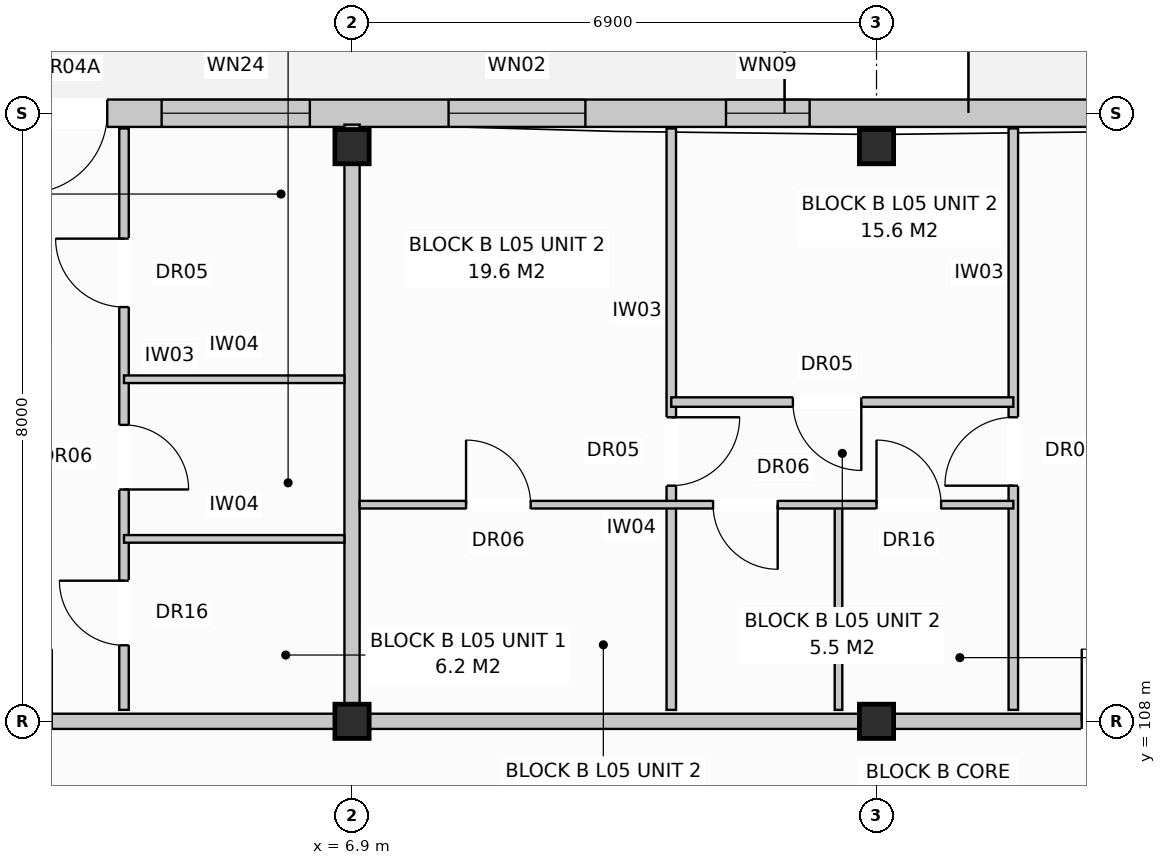
"""IFC4 building model, lengths in metres.
Left out: names, types, materials, properties, quantities, classifications, styles, units other than length and angle.
Written with IfcOpenShell. Run it as: python <this file> out.ifc"""

import sys

from ifc_helpers import new_model, si_unit, direction, frame, frame_2d, origin, origin_with_axes, origin_2d, place, context, subcontext, project, spatial, rectangle, extrude, element, fill, save


model = new_model("IFC4")
c1 = context("Model", 3, precision=1e-05, world=origin(), true_north=direction((0.0, 1.0)))
c2 = subcontext(c1, "Body", "Model", "MODEL_VIEW")
j1 = project(units=[si_unit("LENGTHUNIT", "METRE"), si_unit("PLANEANGLEUNIT", "RADIAN")], contexts=[c1])
p1 = place(None, origin())
s1 = spatial("IfcSite", under=j1, at=p1, CompositionType="ELEMENT")
p2 = place(p1, origin())
s2 = spatial("IfcBuilding", under=s1, at=p2, CompositionType="ELEMENT")
p3 = place(p2, frame((0.0, 0.0, 17.6)))
s3 = spatial("IfcBuildingStorey", under=s2, at=p3, CompositionType="ELEMENT", Elevation=17.6)
for number, where, z_axis, x_axis in (
    (1, (6.9, 108.0, 0.0), (0.0, 0.0, 1.0), (1.0, 0.0, 0.0)),
    (2, (6.9, 115.56, 0.0), (0.0, 0.0, 1.0), (1.0, 0.0, 0.0)),
    (3, (13.8, 108.0, 0.0), (0.0, 0.0, 1.0), (1.0, 0.0, 0.0)),
    (4, (13.8, 115.56, 0.0), (0.0, 0.0, 1.0), (1.0, 0.0, 0.0)),
):
    element("IfcColumn", number, at=place(p3, frame(where, z_axis=z_axis, x_axis=x_axis)), inside=s3, PredefinedType="COLUMN", context=c2, shape_type="SweptSolid", body=[
        extrude(rectangle(XDim=0.45, YDim=0.45, at=origin_2d()), origin(), (0.0, 0.0, 1.0), 3.2),
    ])
p4 = place(p3, frame((0.17, 116.0, 0.0), z_axis=(0.0, 0.0, 1.0), x_axis=(1.0, 0.0, 0.0)))
e5 = element("IfcWall", 5, at=p4, inside=s3, PredefinedType="STANDARD", context=c2, shape_type="SweptSolid", body=[
    extrude(rectangle(XDim=54.86, YDim=0.36, at=frame_2d((27.43, 0.0))), origin(), (0.0, 0.0, 1.0), 2.95),
])
p5 = place(p4, frame((2.459, 0.0, 0.0)))
e6 = element("IfcOpeningElement", 6, at=p5, cuts=e5, PredefinedType="OPENING", context=c2, shape_type="SweptSolid", body=[
    extrude(rectangle(XDim=1.05, YDim=2.12, at=frame_2d((0.525, 1.06))), frame((0.0, 0.192, 0.0), z_axis=(0.0, -1.0, 0.0), x_axis=(1.0, 0.0, 0.0)), (0.0, 0.0, 1.0), 0.384),
])
p6 = place(p4, frame((18.85, 0.0, 0.0)))
e7 = element("IfcOpeningElement", 7, at=p6, cuts=e5, PredefinedType="OPENING", context=c2, shape_type="SweptSolid", body=[
    extrude(rectangle(XDim=1.05, YDim=2.12, at=frame_2d((0.525, 1.06))), frame((0.0, 0.192, 0.0), z_axis=(0.0, -1.0, 0.0), x_axis=(1.0, 0.0, 0.0)), (0.0, 0.0, 1.0), 0.384),
])
p7 = place(p4, frame((28.76, 0.0, 0.0)))
e8 = element("IfcOpeningElement", 8, at=p7, cuts=e5, PredefinedType="OPENING", context=c2, shape_type="SweptSolid", body=[
    extrude(rectangle(XDim=1.05, YDim=2.12, at=frame_2d((0.525, 1.06))), frame((0.0, 0.192, 0.0), z_axis=(0.0, -1.0, 0.0), x_axis=(1.0, 0.0, 0.0)), (0.0, 0.0, 1.0), 0.384),
])
p8 = place(p4, frame((46.45, 0.0, 0.0)))
e9 = element("IfcOpeningElement", 9, at=p8, cuts=e5, PredefinedType="OPENING", context=c2, shape_type="SweptSolid", body=[
    extrude(rectangle(XDim=1.05, YDim=2.12, at=frame_2d((0.525, 1.06))), frame((0.0, 0.192, 0.0), z_axis=(0.0, -1.0, 0.0), x_axis=(1.0, 0.0, 0.0)), (0.0, 0.0, 1.0), 0.384),
])
p9 = place(p4, frame((0.75, 0.0, 0.72)))
e10 = element("IfcOpeningElement", 10, at=p9, cuts=e5, PredefinedType="OPENING", context=c2, shape_type="SweptSolid", body=[
    extrude(rectangle(XDim=1.1, YDim=1.5, at=frame_2d((0.55, 0.75))), frame((0.0, 0.192, 0.0), z_axis=(0.0, -1.0, 0.0), x_axis=(1.0, 0.0, 0.0)), (0.0, 0.0, 1.0), 0.384),
])
p10 = place(p4, frame((4.225, 0.0, 0.8)))
e11 = element("IfcOpeningElement", 11, at=p10, cuts=e5, PredefinedType="OPENING", context=c2, shape_type="SweptSolid", body=[
    extrude(rectangle(XDim=1.95, YDim=1.65, at=frame_2d((0.975, 0.825))), frame((0.0, 0.192, 0.0), z_axis=(0.0, -1.0, 0.0), x_axis=(1.0, 0.0, 0.0)), (0.0, 0.0, 1.0), 0.384),
])
p11 = place(p4, frame((8.0, 0.0, 0.8)))
e12 = element("IfcOpeningElement", 12, at=p11, cuts=e5, PredefinedType="OPENING", context=c2, shape_type="SweptSolid", body=[
    extrude(rectangle(XDim=1.8, YDim=1.7, at=frame_2d((0.9, 0.85))), frame((0.0, 0.192, 0.0), z_axis=(0.0, -1.0, 0.0), x_axis=(1.0, 0.0, 0.0)), (0.0, 0.0, 1.0), 0.384),
])
p12 = place(p4, frame((11.65, 0.0, 0.72)))
e13 = element("IfcOpeningElement", 13, at=p12, cuts=e5, PredefinedType="OPENING", context=c2, shape_type="SweptSolid", body=[
    extrude(rectangle(XDim=1.1, YDim=1.5, at=frame_2d((0.55, 0.75))), frame((0.0, 0.192, 0.0), z_axis=(0.0, -1.0, 0.0), x_axis=(1.0, 0.0, 0.0)), (0.0, 0.0, 1.0), 0.384),
])
p13 = place(p4, frame((16.675, 0.0, 0.8)))
e14 = element("IfcOpeningElement", 14, at=p13, cuts=e5, PredefinedType="OPENING", context=c2, shape_type="SweptSolid", body=[
    extrude(rectangle(XDim=1.95, YDim=1.65, at=frame_2d((0.975, 0.825))), frame((0.0, 0.192, 0.0), z_axis=(0.0, -1.0, 0.0), x_axis=(1.0, 0.0, 0.0)), (0.0, 0.0, 1.0), 0.384),
])
p14 = place(p4, frame((22.3, 0.0, 0.8)))
e15 = element("IfcOpeningElement", 15, at=p14, cuts=e5, PredefinedType="OPENING", context=c2, shape_type="SweptSolid", body=[
    extrude(rectangle(XDim=1.8, YDim=1.7, at=frame_2d((0.9, 0.85))), frame((0.0, 0.192, 0.0), z_axis=(0.0, -1.0, 0.0), x_axis=(1.0, 0.0, 0.0)), (0.0, 0.0, 1.0), 0.384),
])
p15 = place(p4, frame((31.15, 0.0, 0.72)))
e16 = element("IfcOpeningElement", 16, at=p15, cuts=e5, PredefinedType="OPENING", context=c2, shape_type="SweptSolid", body=[
    extrude(rectangle(XDim=1.9, YDim=1.85, at=frame_2d((0.95, 0.925))), frame((0.0, 0.192, 0.0), z_axis=(0.0, -1.0, 0.0), x_axis=(1.0, 0.0, 0.0)), (0.0, 0.0, 1.0), 0.384),
])
p16 = place(p4, frame((36.525, 0.0, 0.8)))
e17 = element("IfcOpeningElement", 17, at=p16, cuts=e5, PredefinedType="OPENING", context=c2, shape_type="SweptSolid", body=[
    extrude(rectangle(XDim=1.95, YDim=1.65, at=frame_2d((0.975, 0.825))), frame((0.0, 0.192, 0.0), z_axis=(0.0, -1.0, 0.0), x_axis=(1.0, 0.0, 0.0)), (0.0, 0.0, 1.0), 0.384),
])
p17 = place(p4, frame((42.3, 0.0, 0.8)))
e18 = element("IfcOpeningElement", 18, at=p17, cuts=e5, PredefinedType="OPENING", context=c2, shape_type="SweptSolid", body=[
    extrude(rectangle(XDim=1.8, YDim=1.7, at=frame_2d((0.9, 0.85))), frame((0.0, 0.192, 0.0), z_axis=(0.0, -1.0, 0.0), x_axis=(1.0, 0.0, 0.0)), (0.0, 0.0, 1.0), 0.384),
])
p18 = place(p4, frame((49.05, 0.0, 0.72)))
e19 = element("IfcOpeningElement", 19, at=p18, cuts=e5, PredefinedType="OPENING", context=c2, shape_type="SweptSolid", body=[
    extrude(rectangle(XDim=1.1, YDim=1.5, at=frame_2d((0.55, 0.75))), frame((0.0, 0.192, 0.0), z_axis=(0.0, -1.0, 0.0), x_axis=(1.0, 0.0, 0.0)), (0.0, 0.0, 1.0), 0.384),
])
p19 = place(p4, frame((52.025, 0.0, 0.8)))
e20 = element("IfcOpeningElement", 20, at=p19, cuts=e5, PredefinedType="OPENING", context=c2, shape_type="SweptSolid", body=[
    extrude(rectangle(XDim=1.95, YDim=1.65, at=frame_2d((0.975, 0.825))), frame((0.0, 0.192, 0.0), z_axis=(0.0, -1.0, 0.0), x_axis=(1.0, 0.0, 0.0)), (0.0, 0.0, 1.0), 0.384),
])
p20 = place(p3, frame((6.9, 108.15, 0.0), z_axis=(0.0, 0.0, 1.0), x_axis=(0.0, 1.0, 0.0)))
e21 = element("IfcWall", 21, at=p20, inside=s3, PredefinedType="PARTITIONING", context=c2, shape_type="SweptSolid", body=[
    extrude(rectangle(XDim=7.7, YDim=0.2, at=frame_2d((3.85, 0.0))), origin(), (0.0, 0.0, 1.0), 2.39),
])
p21 = place(p3, frame((0.0, 108.0, 0.0), z_axis=(0.0, 0.0, 1.0), x_axis=(1.0, 0.0, 0.0)))
e22 = element("IfcWall", 22, at=p21, inside=s3, PredefinedType="PARTITIONING", context=c2, shape_type="SweptSolid", body=[
    extrude(rectangle(XDim=6.9, YDim=0.2, at=frame_2d((3.45, 0.0))), origin(), (0.0, 0.0, 1.0), 2.39),
])
p22 = place(p21, frame((2.0, 0.0, 0.0)))
e23 = element("IfcOpeningElement", 23, at=p22, cuts=e22, PredefinedType="OPENING", context=c2, shape_type="SweptSolid", body=[
    extrude(rectangle(XDim=0.95, YDim=2.15, at=frame_2d((0.475, 1.075))), frame((0.0, 0.112, 0.0), z_axis=(0.0, -1.0, 0.0), x_axis=(1.0, 0.0, 0.0)), (0.0, 0.0, 1.0), 0.224),
])
p23 = place(p3, frame((3.9, 108.15, 0.0), z_axis=(0.0, 0.0, 1.0), x_axis=(0.0, 1.0, 0.0)))
e24 = element("IfcWall", 24, at=p23, inside=s3, PredefinedType="PARTITIONING", context=c2, shape_type="SweptSolid", body=[
    extrude(rectangle(XDim=7.65, YDim=0.125, at=frame_2d((3.825, 0.0))), origin(), (0.0, 0.0, 1.0), 2.95),
])
p24 = place(p23, frame((0.85, 0.0, 0.0)))
e25 = element("IfcOpeningElement", 25, at=p24, cuts=e24, PredefinedType="OPENING", context=c2, shape_type="SweptSolid", body=[
    extrude(rectangle(XDim=0.85, YDim=2.1, at=frame_2d((0.425, 1.05))), frame((0.0, 0.074, 0.0), z_axis=(0.0, -1.0, 0.0), x_axis=(1.0, 0.0, 0.0)), (0.0, 0.0, 1.0), 0.149),
])
p25 = place(p23, frame((2.9, 0.0, 0.0)))
e26 = element("IfcOpeningElement", 26, at=p25, cuts=e24, PredefinedType="OPENING", context=c2, shape_type="SweptSolid", body=[
    extrude(rectangle(XDim=0.85, YDim=2.05, at=frame_2d((0.425, 1.025))), frame((0.0, 0.074, 0.0), z_axis=(0.0, -1.0, 0.0), x_axis=(1.0, 0.0, 0.0)), (0.0, 0.0, 1.0), 0.149),
])
p26 = place(p23, frame((5.3, 0.0, 0.0)))
e27 = element("IfcOpeningElement", 27, at=p26, cuts=e24, PredefinedType="OPENING", context=c2, shape_type="SweptSolid", body=[
    extrude(rectangle(XDim=0.9, YDim=2.1, at=frame_2d((0.45, 1.05))), frame((0.0, 0.074, 0.0), z_axis=(0.0, -1.0, 0.0), x_axis=(1.0, 0.0, 0.0)), (0.0, 0.0, 1.0), 0.149),
])
for number, where, z_axis, x_axis in (
    (28, (3.9, 110.4, 0.0), (0.0, 0.0, 1.0), (1.0, 0.0, 0.0)),
    (29, (3.9, 112.5, 0.0), (0.0, 0.0, 1.0), (1.0, 0.0, 0.0)),
):
    element("IfcWall", number, at=place(p3, frame(where, z_axis=z_axis, x_axis=x_axis)), inside=s3, PredefinedType="PARTITIONING", context=c2, shape_type="SweptSolid", body=[
        extrude(rectangle(XDim=2.9, YDim=0.1, at=frame_2d((1.45, 0.0))), origin(), (0.0, 0.0, 1.0), 2.95),
    ])
p27 = place(p3, frame((6.9, 108.0, 0.0), z_axis=(0.0, 0.0, 1.0), x_axis=(1.0, 0.0, 0.0)))
e30 = element("IfcWall", 30, at=p27, inside=s3, PredefinedType="PARTITIONING", context=c2, shape_type="SweptSolid", body=[
    extrude(rectangle(XDim=13.8, YDim=0.2, at=frame_2d((6.9, 0.0))), origin(), (0.0, 0.0, 1.0), 2.39),
])
p28 = place(p27, frame((9.6, 0.0, 0.0)))
e31 = element("IfcOpeningElement", 31, at=p28, cuts=e30, PredefinedType="OPENING", context=c2, shape_type="SweptSolid", body=[
    extrude(rectangle(XDim=0.95, YDim=2.15, at=frame_2d((0.475, 1.075))), frame((0.0, 0.112, 0.0), z_axis=(0.0, -1.0, 0.0), x_axis=(1.0, 0.0, 0.0)), (0.0, 0.0, 1.0), 0.224),
])
p29 = place(p3, frame((15.6, 108.15, 0.0), z_axis=(0.0, 0.0, 1.0), x_axis=(0.0, 1.0, 0.0)))
e32 = element("IfcWall", 32, at=p29, inside=s3, PredefinedType="PARTITIONING", context=c2, shape_type="SweptSolid", body=[
    extrude(rectangle(XDim=7.65, YDim=0.125, at=frame_2d((3.825, 0.0))), origin(), (0.0, 0.0, 1.0), 2.95),
])
p30 = place(p29, frame((2.95, 0.0, 0.0)))
e33 = element("IfcOpeningElement", 33, at=p30, cuts=e32, PredefinedType="OPENING", context=c2, shape_type="SweptSolid", body=[
    extrude(rectangle(XDim=0.9, YDim=2.1, at=frame_2d((0.45, 1.05))), frame((0.0, 0.074, 0.0), z_axis=(0.0, -1.0, 0.0), x_axis=(1.0, 0.0, 0.0)), (0.0, 0.0, 1.0), 0.149),
])
p31 = place(p3, frame((11.1, 108.15, 0.0), z_axis=(0.0, 0.0, 1.0), x_axis=(0.0, 1.0, 0.0)))
e34 = element("IfcWall", 34, at=p31, inside=s3, PredefinedType="PARTITIONING", context=c2, shape_type="SweptSolid", body=[
    extrude(rectangle(XDim=7.65, YDim=0.125, at=frame_2d((3.825, 0.0))), origin(), (0.0, 0.0, 1.0), 2.95),
])
p32 = place(p31, frame((2.95, 0.0, 0.0)))
e35 = element("IfcOpeningElement", 35, at=p32, cuts=e34, PredefinedType="OPENING", context=c2, shape_type="SweptSolid", body=[
    extrude(rectangle(XDim=0.9, YDim=2.1, at=frame_2d((0.45, 1.05))), frame((0.0, 0.074, 0.0), z_axis=(0.0, -1.0, 0.0), x_axis=(1.0, 0.0, 0.0)), (0.0, 0.0, 1.0), 0.149),
])
p33 = place(p3, frame((13.3, 108.15, 0.0), z_axis=(0.0, 0.0, 1.0), x_axis=(0.0, 1.0, 0.0)))
e36 = element("IfcWall", 36, at=p33, inside=s3, PredefinedType="PARTITIONING", context=c2, shape_type="SweptSolid", body=[
    extrude(rectangle(XDim=2.7, YDim=0.1, at=frame_2d((1.35, 0.0))), origin(), (0.0, 0.0, 1.0), 2.95),
])
p34 = place(p3, frame((7.0, 110.85, 0.0), z_axis=(0.0, 0.0, 1.0), x_axis=(1.0, 0.0, 0.0)))
e37 = element("IfcWall", 37, at=p34, inside=s3, PredefinedType="PARTITIONING", context=c2, shape_type="SweptSolid", body=[
    extrude(rectangle(XDim=8.6, YDim=0.1, at=frame_2d((4.3, 0.0))), origin(), (0.0, 0.0, 1.0), 2.95),
])
p35 = place(p34, frame((1.4, 0.0, 0.0)))
e38 = element("IfcOpeningElement", 38, at=p35, cuts=e37, PredefinedType="OPENING", context=c2, shape_type="SweptSolid", body=[
    extrude(rectangle(XDim=0.85, YDim=2.05, at=frame_2d((0.425, 1.025))), frame((0.0, 0.062, 0.0), z_axis=(0.0, -1.0, 0.0), x_axis=(1.0, 0.0, 0.0)), (0.0, 0.0, 1.0), 0.124),
])
p36 = place(p34, frame((4.65, 0.0, 0.0)))
e39 = element("IfcOpeningElement", 39, at=p36, cuts=e37, PredefinedType="OPENING", context=c2, shape_type="SweptSolid", body=[
    extrude(rectangle(XDim=0.85, YDim=2.05, at=frame_2d((0.425, 1.025))), frame((0.0, 0.062, 0.0), z_axis=(0.0, -1.0, 0.0), x_axis=(1.0, 0.0, 0.0)), (0.0, 0.0, 1.0), 0.124),
])
p37 = place(p34, frame((6.8, 0.0, 0.0)))
e40 = element("IfcOpeningElement", 40, at=p37, cuts=e37, PredefinedType="OPENING", context=c2, shape_type="SweptSolid", body=[
    extrude(rectangle(XDim=0.85, YDim=2.1, at=frame_2d((0.425, 1.05))), frame((0.0, 0.062, 0.0), z_axis=(0.0, -1.0, 0.0), x_axis=(1.0, 0.0, 0.0)), (0.0, 0.0, 1.0), 0.124),
])
p38 = place(p3, frame((11.1, 112.2, 0.0), z_axis=(0.0, 0.0, 1.0), x_axis=(1.0, 0.0, 0.0)))
e41 = element("IfcWall", 41, at=p38, inside=s3, PredefinedType="PARTITIONING", context=c2, shape_type="SweptSolid", body=[
    extrude(rectangle(XDim=4.5, YDim=0.125, at=frame_2d((2.25, 0.0))), origin(), (0.0, 0.0, 1.0), 2.95),
])
p39 = place(p38, frame((1.6, 0.0, 0.0)))
e42 = element("IfcOpeningElement", 42, at=p39, cuts=e41, PredefinedType="OPENING", context=c2, shape_type="SweptSolid", body=[
    extrude(rectangle(XDim=0.9, YDim=2.1, at=frame_2d((0.45, 1.05))), frame((0.0, 0.074, 0.0), z_axis=(0.0, -1.0, 0.0), x_axis=(1.0, 0.0, 0.0)), (0.0, 0.0, 1.0), 0.149),
])
p40 = place(p5, frame((1.05, 0.0, 0.0), z_axis=(0.0, 0.0, 1.0), x_axis=(-1.0, 0.0, 0.0)))
e43 = element("IfcDoor", 43, at=p40, inside=s3, OperationType="SINGLE_SWING_LEFT", PredefinedType="DOOR", context=c2, shape_type="SweptSolid", body=[
    extrude(rectangle(XDim=1.05, YDim=2.12, at=frame_2d((0.525, 1.06))), frame((0.0, 0.025, 0.0), z_axis=(0.0, -1.0, 0.0), x_axis=(1.0, 0.0, 0.0)), (0.0, 0.0, 1.0), 0.05),
])
fill(e6, e43)
p41 = place(p10, origin_with_axes())
e44 = element("IfcWindow", 44, at=p41, inside=s3, PartitioningType="SINGLE_PANEL", PredefinedType="WINDOW", context=c2, shape_type="SweptSolid", body=[
    extrude(rectangle(XDim=1.95, YDim=1.65, at=frame_2d((0.975, 0.825))), frame((0.0, 0.03, 0.0), z_axis=(0.0, -1.0, 0.0), x_axis=(1.0, 0.0, 0.0)), (0.0, 0.0, 1.0), 0.06),
])
fill(e11, e44)
p42 = place(p11, origin_with_axes())
e45 = element("IfcWindow", 45, at=p42, inside=s3, PartitioningType="SINGLE_PANEL", PredefinedType="WINDOW", context=c2, shape_type="SweptSolid", body=[
    extrude(rectangle(XDim=1.8, YDim=1.7, at=frame_2d((0.9, 0.85))), frame((0.0, 0.03, 0.0), z_axis=(0.0, -1.0, 0.0), x_axis=(1.0, 0.0, 0.0)), (0.0, 0.0, 1.0), 0.06),
])
fill(e12, e45)
p43 = place(p12, origin_with_axes())
e46 = element("IfcWindow", 46, at=p43, inside=s3, PartitioningType="SINGLE_PANEL", PredefinedType="WINDOW", context=c2, shape_type="SweptSolid", body=[
    extrude(rectangle(XDim=1.1, YDim=1.5, at=frame_2d((0.55, 0.75))), frame((0.0, 0.03, 0.0), z_axis=(0.0, -1.0, 0.0), x_axis=(1.0, 0.0, 0.0)), (0.0, 0.0, 1.0), 0.06),
])
fill(e13, e46)
p44 = place(p22, origin_with_axes())
e47 = element("IfcDoor", 47, at=p44, inside=s3, OperationType="SINGLE_SWING_RIGHT", PredefinedType="DOOR", context=c2, shape_type="SweptSolid", body=[
    extrude(rectangle(XDim=0.95, YDim=2.15, at=frame_2d((0.475, 1.075))), frame((0.0, 0.025, 0.0), z_axis=(0.0, -1.0, 0.0), x_axis=(1.0, 0.0, 0.0)), (0.0, 0.0, 1.0), 0.05),
])
fill(e23, e47)
p45 = place(p24, origin_with_axes())
e48 = element("IfcDoor", 48, at=p45, inside=s3, OperationType="SINGLE_SWING_RIGHT", PredefinedType="DOOR", context=c2, shape_type="SweptSolid", body=[
    extrude(rectangle(XDim=0.85, YDim=2.1, at=frame_2d((0.425, 1.05))), frame((0.0, 0.025, 0.0), z_axis=(0.0, -1.0, 0.0), x_axis=(1.0, 0.0, 0.0)), (0.0, 0.0, 1.0), 0.05),
])
fill(e25, e48)
p46 = place(p25, frame((0.85, 0.0, 0.0), z_axis=(0.0, 0.0, 1.0), x_axis=(-1.0, 0.0, 0.0)))
e49 = element("IfcDoor", 49, at=p46, inside=s3, OperationType="SINGLE_SWING_LEFT", PredefinedType="DOOR", context=c2, shape_type="SweptSolid", body=[
    extrude(rectangle(XDim=0.85, YDim=2.05, at=frame_2d((0.425, 1.025))), frame((0.0, 0.025, 0.0), z_axis=(0.0, -1.0, 0.0), x_axis=(1.0, 0.0, 0.0)), (0.0, 0.0, 1.0), 0.05),
])
fill(e26, e49)
p47 = place(p26, origin_with_axes())
e50 = element("IfcDoor", 50, at=p47, inside=s3, OperationType="SINGLE_SWING_RIGHT", PredefinedType="DOOR", context=c2, shape_type="SweptSolid", body=[
    extrude(rectangle(XDim=0.9, YDim=2.1, at=frame_2d((0.45, 1.05))), frame((0.0, 0.025, 0.0), z_axis=(0.0, -1.0, 0.0), x_axis=(1.0, 0.0, 0.0)), (0.0, 0.0, 1.0), 0.05),
])
fill(e27, e50)
p48 = place(p28, origin_with_axes())
e51 = element("IfcDoor", 51, at=p48, inside=s3, OperationType="SINGLE_SWING_LEFT", PredefinedType="DOOR", context=c2, shape_type="SweptSolid", body=[
    extrude(rectangle(XDim=0.95, YDim=2.15, at=frame_2d((0.475, 1.075))), frame((0.0, 0.025, 0.0), z_axis=(0.0, -1.0, 0.0), x_axis=(1.0, 0.0, 0.0)), (0.0, 0.0, 1.0), 0.05),
])
fill(e31, e51)
p49 = place(p30, origin_with_axes())
e52 = element("IfcDoor", 52, at=p49, inside=s3, OperationType="SINGLE_SWING_LEFT", PredefinedType="DOOR", context=c2, shape_type="SweptSolid", body=[
    extrude(rectangle(XDim=0.9, YDim=2.1, at=frame_2d((0.45, 1.05))), frame((0.0, 0.025, 0.0), z_axis=(0.0, -1.0, 0.0), x_axis=(1.0, 0.0, 0.0)), (0.0, 0.0, 1.0), 0.05),
])
fill(e33, e52)
p50 = place(p32, frame((0.9, 0.0, 0.0), z_axis=(0.0, 0.0, 1.0), x_axis=(-1.0, 0.0, 0.0)))
e53 = element("IfcDoor", 53, at=p50, inside=s3, OperationType="SINGLE_SWING_RIGHT", PredefinedType="DOOR", context=c2, shape_type="SweptSolid", body=[
    extrude(rectangle(XDim=0.9, YDim=2.1, at=frame_2d((0.45, 1.05))), frame((0.0, 0.025, 0.0), z_axis=(0.0, -1.0, 0.0), x_axis=(1.0, 0.0, 0.0)), (0.0, 0.0, 1.0), 0.05),
])
fill(e35, e53)
p51 = place(p35, origin_with_axes())
e54 = element("IfcDoor", 54, at=p51, inside=s3, OperationType="SINGLE_SWING_LEFT", PredefinedType="DOOR", context=c2, shape_type="SweptSolid", body=[
    extrude(rectangle(XDim=0.85, YDim=2.05, at=frame_2d((0.425, 1.025))), frame((0.0, 0.025, 0.0), z_axis=(0.0, -1.0, 0.0), x_axis=(1.0, 0.0, 0.0)), (0.0, 0.0, 1.0), 0.05),
])
fill(e38, e54)
p52 = place(p36, frame((0.85, 0.0, 0.0), z_axis=(0.0, 0.0, 1.0), x_axis=(-1.0, 0.0, 0.0)))
e55 = element("IfcDoor", 55, at=p52, inside=s3, OperationType="SINGLE_SWING_RIGHT", PredefinedType="DOOR", context=c2, shape_type="SweptSolid", body=[
    extrude(rectangle(XDim=0.85, YDim=2.05, at=frame_2d((0.425, 1.025))), frame((0.0, 0.025, 0.0), z_axis=(0.0, -1.0, 0.0), x_axis=(1.0, 0.0, 0.0)), (0.0, 0.0, 1.0), 0.05),
])
fill(e39, e55)
p53 = place(p37, origin_with_axes())
e56 = element("IfcDoor", 56, at=p53, inside=s3, OperationType="SINGLE_SWING_LEFT", PredefinedType="DOOR", context=c2, shape_type="SweptSolid", body=[
    extrude(rectangle(XDim=0.85, YDim=2.1, at=frame_2d((0.425, 1.05))), frame((0.0, 0.025, 0.0), z_axis=(0.0, -1.0, 0.0), x_axis=(1.0, 0.0, 0.0)), (0.0, 0.0, 1.0), 0.05),
])
fill(e40, e56)
p54 = place(p39, frame((0.9, 0.0, 0.0), z_axis=(0.0, 0.0, 1.0), x_axis=(-1.0, 0.0, 0.0)))
e57 = element("IfcDoor", 57, at=p54, inside=s3, OperationType="SINGLE_SWING_RIGHT", PredefinedType="DOOR", context=c2, shape_type="SweptSolid", body=[
    extrude(rectangle(XDim=0.9, YDim=2.1, at=frame_2d((0.45, 1.05))), frame((0.0, 0.025, 0.0), z_axis=(0.0, -1.0, 0.0), x_axis=(1.0, 0.0, 0.0)), (0.0, 0.0, 1.0), 0.05),
])
fill(e42, e57)
save(model, sys.argv[1])
